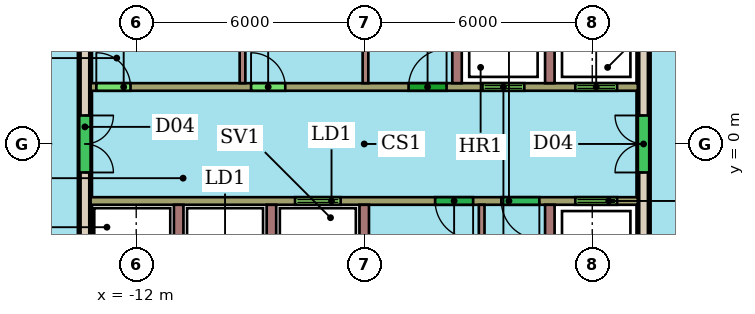
"""IFC4 building model, lengths in metres.
Left out: names, types, materials, properties, quantities, classifications, styles, units other than length and angle.
Written with IfcOpenShell. Run it as: python <this file> out.ifc"""

import sys

from ifc_helpers import new_model, si_unit, direction, frame, frame_2d, origin, place, context, subcontext, project, spatial, rectangle, extrude, element, fill, save


model = new_model("IFC4")
c1 = context("Model", 3, precision=1e-05, world=origin(), true_north=direction((0.0, 1.0)))
c2 = subcontext(c1, "Body", "Model", "MODEL_VIEW")
j1 = project(units=[si_unit("LENGTHUNIT", "METRE"), si_unit("PLANEANGLEUNIT", "RADIAN")], contexts=[c1])
p1 = place(None, origin())
s1 = spatial("IfcSite", under=j1, at=p1, CompositionType="ELEMENT")
p2 = place(p1, origin())
s2 = spatial("IfcBuilding", under=s1, at=p2, CompositionType="ELEMENT")
p3 = place(p2, frame((0.0, 0.0, 282.9)))
s3 = spatial("IfcBuildingStorey", under=s2, at=p3, CompositionType="ELEMENT", Elevation=282.9)
p4 = place(p3, frame((-13.35, 7.3, 0.0), z_axis=(0.0, 0.0, 1.0), x_axis=(0.0, -1.0, 0.0)))
e1 = element("IfcWall", 1, at=p4, inside=s3, PredefinedType="SHEAR", context=c2, shape_type="SweptSolid", body=[
    extrude(rectangle(XDim=14.6, YDim=0.3, at=frame_2d((7.3, 0.0))), origin(), (0.0, 0.0, 1.0), 3.3),
])
p5 = place(p4, frame((6.55, 0.0, 0.0)))
e2 = element("IfcOpeningElement", 2, at=p5, cuts=e1, PredefinedType="OPENING", context=c2, shape_type="SweptSolid", body=[
    extrude(rectangle(XDim=1.5, YDim=2.1, at=frame_2d((0.75, 1.05))), frame((0.0, 0.16, 0.0), z_axis=(0.0, -1.0, 0.0), x_axis=(1.0, 0.0, 0.0)), (0.0, 0.0, 1.0), 0.32),
])
p6 = place(p3, frame((1.35, -7.3, 0.0), z_axis=(0.0, 0.0, 1.0), x_axis=(0.0, 1.0, 0.0)))
e3 = element("IfcWall", 3, at=p6, inside=s3, PredefinedType="SHEAR", context=c2, shape_type="SweptSolid", body=[
    extrude(rectangle(XDim=14.6, YDim=0.3, at=frame_2d((7.3, 0.0))), origin(), (0.0, 0.0, 1.0), 3.3),
])
p7 = place(p6, frame((1.21, 0.0, 0.0)))
e4 = element("IfcOpeningElement", 4, at=p7, cuts=e3, PredefinedType="OPENING", context=c2, shape_type="SweptSolid", body=[
    extrude(rectangle(XDim=1.0, YDim=2.1, at=frame_2d((0.5, 1.05))), frame((0.0, 0.16, 0.0), z_axis=(0.0, -1.0, 0.0), x_axis=(1.0, 0.0, 0.0)), (0.0, 0.0, 1.0), 0.32),
])
p8 = place(p6, frame((6.55, 0.0, 0.0)))
e5 = element("IfcOpeningElement", 5, at=p8, cuts=e3, PredefinedType="OPENING", context=c2, shape_type="SweptSolid", body=[
    extrude(rectangle(XDim=1.5, YDim=2.1, at=frame_2d((0.75, 1.05))), frame((0.0, 0.16, 0.0), z_axis=(0.0, -1.0, 0.0), x_axis=(1.0, 0.0, 0.0)), (0.0, 0.0, 1.0), 0.32),
])
p9 = place(p3, frame((-13.2, 1.5, 0.0), z_axis=(0.0, 0.0, 1.0), x_axis=(1.0, 0.0, 0.0)))
e6 = element("IfcWall", 6, at=p9, inside=s3, PredefinedType="SHEAR", context=c2, shape_type="SweptSolid", body=[
    extrude(rectangle(XDim=14.4, YDim=0.2, at=frame_2d((7.2, 0.0))), origin(), (0.0, 0.0, 1.0), 3.3),
])
p10 = place(p9, frame((10.312, 0.0, 0.0)))
e7 = element("IfcOpeningElement", 7, at=p10, cuts=e6, PredefinedType="OPENING", context=c2, shape_type="SweptSolid", body=[
    extrude(rectangle(XDim=1.1, YDim=2.1, at=frame_2d((0.55, 1.05))), frame((0.0, 0.11, 0.0), z_axis=(0.0, -1.0, 0.0), x_axis=(1.0, 0.0, 0.0)), (0.0, 0.0, 1.0), 0.22),
])
p11 = place(p9, frame((12.754, 0.0, 0.0)))
e8 = element("IfcOpeningElement", 8, at=p11, cuts=e6, PredefinedType="OPENING", context=c2, shape_type="SweptSolid", body=[
    extrude(rectangle(XDim=1.1, YDim=2.1, at=frame_2d((0.55, 1.05))), frame((0.0, 0.11, 0.0), z_axis=(0.0, -1.0, 0.0), x_axis=(1.0, 0.0, 0.0)), (0.0, 0.0, 1.0), 0.22),
])
p12 = place(p9, frame((0.15, 0.0, 0.0)))
e9 = element("IfcOpeningElement", 9, at=p12, cuts=e6, PredefinedType="OPENING", context=c2, shape_type="SweptSolid", body=[
    extrude(rectangle(XDim=0.9, YDim=2.1, at=frame_2d((0.45, 1.05))), frame((0.0, 0.11, 0.0), z_axis=(0.0, -1.0, 0.0), x_axis=(1.0, 0.0, 0.0)), (0.0, 0.0, 1.0), 0.22),
])
p13 = place(p9, frame((4.222, 0.0, 0.0)))
e10 = element("IfcOpeningElement", 10, at=p13, cuts=e6, PredefinedType="OPENING", context=c2, shape_type="SweptSolid", body=[
    extrude(rectangle(XDim=0.9, YDim=2.1, at=frame_2d((0.45, 1.05))), frame((0.0, 0.11, 0.0), z_axis=(0.0, -1.0, 0.0), x_axis=(1.0, 0.0, 0.0)), (0.0, 0.0, 1.0), 0.22),
])
p14 = place(p9, frame((8.367, 0.0, 0.0)))
e11 = element("IfcOpeningElement", 11, at=p14, cuts=e6, PredefinedType="OPENING", context=c2, shape_type="SweptSolid", body=[
    extrude(rectangle(XDim=1.0, YDim=2.1, at=frame_2d((0.5, 1.05))), frame((0.0, 0.11, 0.0), z_axis=(0.0, -1.0, 0.0), x_axis=(1.0, 0.0, 0.0)), (0.0, 0.0, 1.0), 0.22),
])
p15 = place(p3, frame((1.2, -1.5, 0.0), z_axis=(0.0, 0.0, 1.0), x_axis=(-1.0, 0.0, 0.0)))
e12 = element("IfcWall", 12, at=p15, inside=s3, PredefinedType="SHEAR", context=c2, shape_type="SweptSolid", body=[
    extrude(rectangle(XDim=14.4, YDim=0.2, at=frame_2d((7.2, 0.0))), origin(), (0.0, 0.0, 1.0), 3.3),
])
p16 = place(p15, frame((7.821, 0.0, 0.0)))
e13 = element("IfcOpeningElement", 13, at=p16, cuts=e12, PredefinedType="OPENING", context=c2, shape_type="SweptSolid", body=[
    extrude(rectangle(XDim=1.2, YDim=2.1, at=frame_2d((0.6, 1.05))), frame((0.0, 0.11, 0.0), z_axis=(0.0, -1.0, 0.0), x_axis=(1.0, 0.0, 0.0)), (0.0, 0.0, 1.0), 0.22),
])
p17 = place(p15, frame((0.546, 0.0, 0.0)))
e14 = element("IfcOpeningElement", 14, at=p17, cuts=e12, PredefinedType="OPENING", context=c2, shape_type="SweptSolid", body=[
    extrude(rectangle(XDim=1.1, YDim=2.1, at=frame_2d((0.55, 1.05))), frame((0.0, 0.11, 0.0), z_axis=(0.0, -1.0, 0.0), x_axis=(1.0, 0.0, 0.0)), (0.0, 0.0, 1.0), 0.22),
])
p18 = place(p15, frame((4.335, 0.0, 0.0)))
e15 = element("IfcOpeningElement", 15, at=p18, cuts=e12, PredefinedType="OPENING", context=c2, shape_type="SweptSolid", body=[
    extrude(rectangle(XDim=1.0, YDim=2.1, at=frame_2d((0.5, 1.05))), frame((0.0, 0.11, 0.0), z_axis=(0.0, -1.0, 0.0), x_axis=(1.0, 0.0, 0.0)), (0.0, 0.0, 1.0), 0.22),
])
p19 = place(p15, frame((2.592, 0.0, 0.0)))
e16 = element("IfcOpeningElement", 16, at=p19, cuts=e12, PredefinedType="OPENING", context=c2, shape_type="SweptSolid", body=[
    extrude(rectangle(XDim=1.0, YDim=2.1, at=frame_2d((0.5, 1.05))), frame((0.0, 0.11, 0.0), z_axis=(0.0, -1.0, 0.0), x_axis=(1.0, 0.0, 0.0)), (0.0, 0.0, 1.0), 0.22),
])
for number, where, z_axis, x_axis in (
    (17, (-3.558, 1.6, 0.0), (0.0, 0.0, 1.0), (0.0, 1.0, 0.0)),
    (18, (-1.117, 1.6, 0.0), (0.0, 0.0, 1.0), (0.0, 1.0, 0.0)),
):
    element("IfcWall", number, at=place(p3, frame(where, z_axis=z_axis, x_axis=x_axis)), inside=s3, PredefinedType="SHEAR", context=c2, shape_type="SweptSolid", body=[
        extrude(rectangle(XDim=1.93, YDim=0.25, at=frame_2d((0.965, 0.0))), origin(), (0.0, 0.0, 1.0), 3.3),
    ])
for number, where, z_axis, x_axis in (
    (19, (-9.203, 1.6, 0.0), (0.0, 0.0, 1.0), (0.0, 1.0, 0.0)),
    (20, (-5.967, 1.6, 0.0), (0.0, 0.0, 1.0), (0.0, 1.0, 0.0)),
):
    element("IfcWall", number, at=place(p3, frame(where, z_axis=z_axis, x_axis=x_axis)), inside=s3, PredefinedType="PARTITIONING", context=c2, shape_type="SweptSolid", body=[
        extrude(rectangle(XDim=1.93, YDim=0.15, at=frame_2d((0.965, 0.0))), origin(), (0.0, 0.0, 1.0), 3.3),
    ])
for number, where, z_axis, x_axis in (
    (21, (-10.883, -1.6, 0.0), (0.0, 0.0, 1.0), (0.0, -1.0, 0.0)),
    (22, (-8.442, -1.6, 0.0), (0.0, 0.0, 1.0), (0.0, -1.0, 0.0)),
    (23, (-6.0, -1.6, 0.0), (0.0, 0.0, 1.0), (0.0, -1.0, 0.0)),
    (24, (-1.117, -1.6, 0.0), (0.0, 0.0, 1.0), (0.0, -1.0, 0.0)),
):
    element("IfcWall", number, at=place(p3, frame(where, z_axis=z_axis, x_axis=x_axis)), inside=s3, PredefinedType="SHEAR", context=c2, shape_type="SweptSolid", body=[
        extrude(rectangle(XDim=1.93, YDim=0.25, at=frame_2d((0.965, 0.0))), origin(), (0.0, 0.0, 1.0), 3.3),
    ])
p20 = place(p3, frame((-2.91, -1.6, 0.0), z_axis=(0.0, 0.0, 1.0), x_axis=(0.0, -1.0, 0.0)))
e25 = element("IfcWall", 25, at=p20, inside=s3, PredefinedType="PARTITIONING", context=c2, shape_type="SweptSolid", body=[
    extrude(rectangle(XDim=1.93, YDim=0.15, at=frame_2d((0.965, 0.0))), origin(), (0.0, 0.0, 1.0), 3.3),
])
p21 = place(p5, origin())
e26 = element("IfcDoor", 26, at=p21, inside=s3, OperationType="DOUBLE_DOOR_SINGLE_SWING", PredefinedType="NOTDEFINED", context=c2, shape_type="SweptSolid", body=[
    extrude(rectangle(XDim=1.5, YDim=2.1, at=frame_2d((0.75, 1.05))), frame((0.0, 0.025, 0.0), z_axis=(0.0, -1.0, 0.0), x_axis=(1.0, 0.0, 0.0)), (0.0, 0.0, 1.0), 0.05),
])
fill(e2, e26)
p22 = place(p8, origin())
e27 = element("IfcDoor", 27, at=p22, inside=s3, OperationType="DOUBLE_DOOR_SINGLE_SWING", PredefinedType="NOTDEFINED", context=c2, shape_type="SweptSolid", body=[
    extrude(rectangle(XDim=1.5, YDim=2.1, at=frame_2d((0.75, 1.05))), frame((0.0, 0.025, 0.0), z_axis=(0.0, -1.0, 0.0), x_axis=(1.0, 0.0, 0.0)), (0.0, 0.0, 1.0), 0.05),
])
fill(e5, e27)
p23 = place(p10, origin())
e28 = element("IfcDoor", 28, at=p23, inside=s3, OperationType="DOUBLE_DOOR_SLIDING", PredefinedType="NOTDEFINED", context=c2, shape_type="SweptSolid", body=[
    extrude(rectangle(XDim=1.1, YDim=2.1, at=frame_2d((0.55, 1.05))), frame((0.0, 0.025, 0.0), z_axis=(0.0, -1.0, 0.0), x_axis=(1.0, 0.0, 0.0)), (0.0, 0.0, 1.0), 0.05),
])
fill(e7, e28)
p24 = place(p11, origin())
e29 = element("IfcDoor", 29, at=p24, inside=s3, OperationType="DOUBLE_DOOR_SLIDING", PredefinedType="NOTDEFINED", context=c2, shape_type="SweptSolid", body=[
    extrude(rectangle(XDim=1.1, YDim=2.1, at=frame_2d((0.55, 1.05))), frame((0.0, 0.025, 0.0), z_axis=(0.0, -1.0, 0.0), x_axis=(1.0, 0.0, 0.0)), (0.0, 0.0, 1.0), 0.05),
])
fill(e8, e29)
p25 = place(p12, origin())
e30 = element("IfcDoor", 30, at=p25, inside=s3, OperationType="SINGLE_SWING_LEFT", PredefinedType="NOTDEFINED", context=c2, shape_type="SweptSolid", body=[
    extrude(rectangle(XDim=0.9, YDim=2.1, at=frame_2d((0.45, 1.05))), frame((0.0, 0.025, 0.0), z_axis=(0.0, -1.0, 0.0), x_axis=(1.0, 0.0, 0.0)), (0.0, 0.0, 1.0), 0.05),
])
fill(e9, e30)
p26 = place(p13, origin())
e31 = element("IfcDoor", 31, at=p26, inside=s3, OperationType="SINGLE_SWING_LEFT", PredefinedType="NOTDEFINED", context=c2, shape_type="SweptSolid", body=[
    extrude(rectangle(XDim=0.9, YDim=2.1, at=frame_2d((0.45, 1.05))), frame((0.0, 0.025, 0.0), z_axis=(0.0, -1.0, 0.0), x_axis=(1.0, 0.0, 0.0)), (0.0, 0.0, 1.0), 0.05),
])
fill(e10, e31)
p27 = place(p14, origin())
e32 = element("IfcDoor", 32, at=p27, inside=s3, OperationType="SINGLE_SWING_RIGHT", PredefinedType="NOTDEFINED", context=c2, shape_type="SweptSolid", body=[
    extrude(rectangle(XDim=1.0, YDim=2.1, at=frame_2d((0.5, 1.05))), frame((0.0, 0.025, 0.0), z_axis=(0.0, -1.0, 0.0), x_axis=(1.0, 0.0, 0.0)), (0.0, 0.0, 1.0), 0.05),
])
fill(e11, e32)
p28 = place(p16, origin())
e33 = element("IfcDoor", 33, at=p28, inside=s3, OperationType="DOUBLE_DOOR_SLIDING", PredefinedType="NOTDEFINED", context=c2, shape_type="SweptSolid", body=[
    extrude(rectangle(XDim=1.2, YDim=2.1, at=frame_2d((0.6, 1.05))), frame((0.0, 0.025, 0.0), z_axis=(0.0, -1.0, 0.0), x_axis=(1.0, 0.0, 0.0)), (0.0, 0.0, 1.0), 0.05),
])
fill(e13, e33)
p29 = place(p17, origin())
e34 = element("IfcDoor", 34, at=p29, inside=s3, OperationType="DOUBLE_DOOR_SLIDING", PredefinedType="NOTDEFINED", context=c2, shape_type="SweptSolid", body=[
    extrude(rectangle(XDim=1.1, YDim=2.1, at=frame_2d((0.55, 1.05))), frame((0.0, 0.025, 0.0), z_axis=(0.0, -1.0, 0.0), x_axis=(1.0, 0.0, 0.0)), (0.0, 0.0, 1.0), 0.05),
])
fill(e14, e34)
p30 = place(p18, origin())
e35 = element("IfcDoor", 35, at=p30, inside=s3, OperationType="SINGLE_SWING_LEFT", PredefinedType="NOTDEFINED", context=c2, shape_type="SweptSolid", body=[
    extrude(rectangle(XDim=1.0, YDim=2.1, at=frame_2d((0.5, 1.05))), frame((0.0, 0.025, 0.0), z_axis=(0.0, -1.0, 0.0), x_axis=(1.0, 0.0, 0.0)), (0.0, 0.0, 1.0), 0.05),
])
fill(e15, e35)
p31 = place(p19, origin())
e36 = element("IfcDoor", 36, at=p31, inside=s3, OperationType="SINGLE_SWING_LEFT", PredefinedType="NOTDEFINED", context=c2, shape_type="SweptSolid", body=[
    extrude(rectangle(XDim=1.0, YDim=2.1, at=frame_2d((0.5, 1.05))), frame((0.0, 0.025, 0.0), z_axis=(0.0, -1.0, 0.0), x_axis=(1.0, 0.0, 0.0)), (0.0, 0.0, 1.0), 0.05),
])
fill(e16, e36)
save(model, sys.argv[1])
